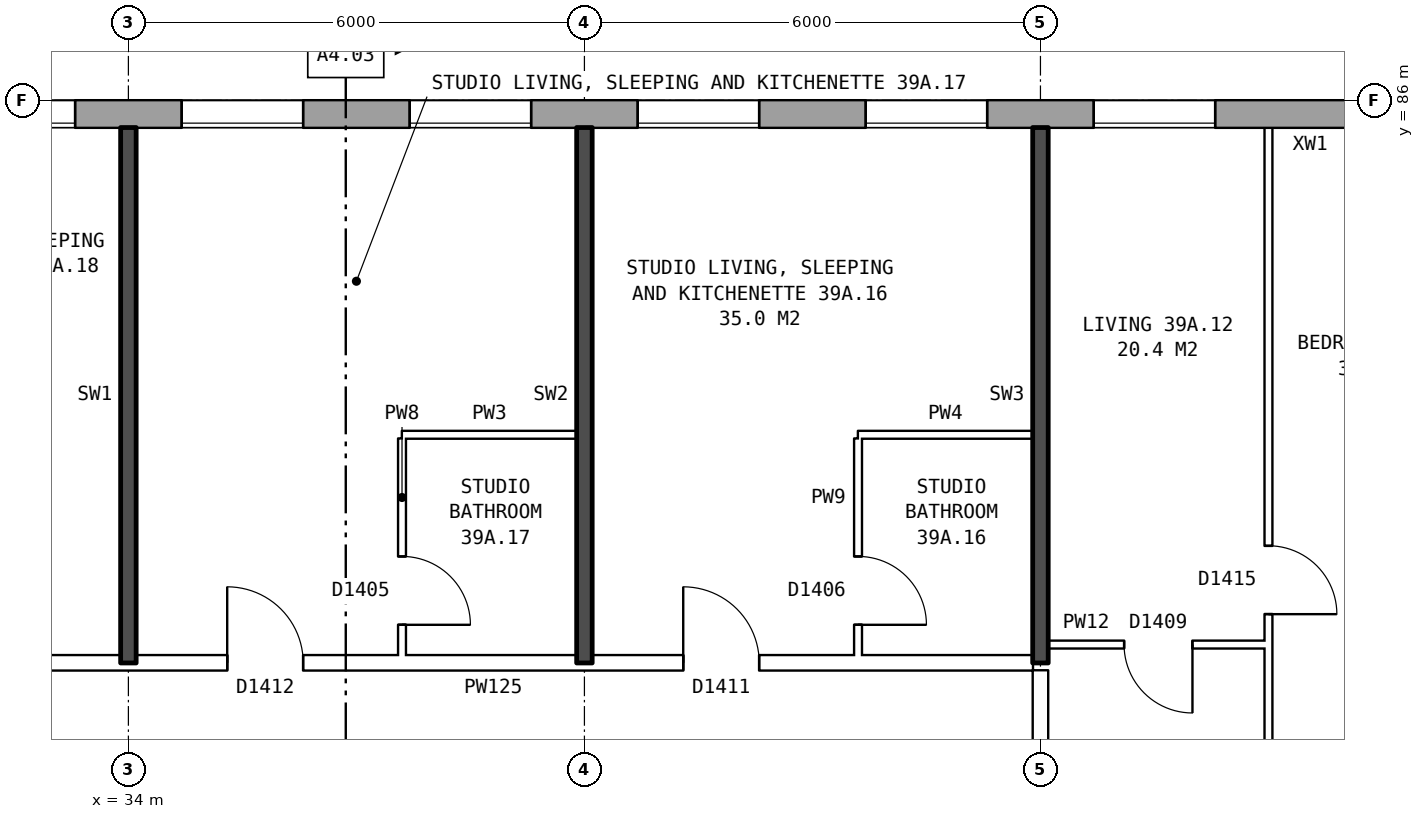
"""IFC4 building model, lengths in metres.
Left out: names, types, materials, properties, quantities, classifications, styles, units other than length and angle.
Written with IfcOpenShell. Run it as: python <this file> out.ifc"""

import sys

from ifc_helpers import new_model, si_unit, direction, frame, frame_2d, origin, place, context, subcontext, project, spatial, rectangle, extrude, element, fill, save


model = new_model("IFC4")
c1 = context("Model", 3, precision=1e-05, world=origin(), true_north=direction((0.0, 1.0)))
c2 = subcontext(c1, "Body", "Model", "MODEL_VIEW")
j1 = project(units=[si_unit("LENGTHUNIT", "METRE"), si_unit("PLANEANGLEUNIT", "RADIAN")], contexts=[c1])
p1 = place(None, origin())
s1 = spatial("IfcSite", under=j1, at=p1, CompositionType="ELEMENT")
p2 = place(p1, origin())
s2 = spatial("IfcBuilding", under=s1, at=p2, CompositionType="ELEMENT")
p3 = place(p2, frame((0.0, 0.0, 139.2)))
s3 = spatial("IfcBuildingStorey", under=s2, at=p3, CompositionType="ELEMENT", Elevation=139.2)
p4 = place(p3, frame((72.925, 85.82, 0.0), z_axis=(0.0, 0.0, 1.0), x_axis=(-1.0, 0.0, 0.0)))
e1 = element("IfcWall", 1, at=p4, inside=s3, PredefinedType="STANDARD", context=c2, shape_type="SweptSolid", body=[
    extrude(rectangle(XDim=43.101, YDim=0.36, at=frame_2d((21.55, 0.0))), origin(), (0.0, 0.0, 1.0), 2.85),
])
p5 = place(p4, frame((0.625, 0.0, 0.8)))
e2 = element("IfcOpeningElement", 2, at=p5, cuts=e1, PredefinedType="OPENING", context=c2, shape_type="SweptSolid", body=[
    extrude(rectangle(XDim=1.6, YDim=1.8, at=frame_2d((0.8, 0.9))), frame((0.0, 0.19, 0.0), z_axis=(0.0, -1.0, 0.0), x_axis=(1.0, 0.0, 0.0)), (0.0, 0.0, 1.0), 0.38),
])
p6 = place(p4, frame((3.625, 0.0, 0.8)))
e3 = element("IfcOpeningElement", 3, at=p6, cuts=e1, PredefinedType="OPENING", context=c2, shape_type="SweptSolid", body=[
    extrude(rectangle(XDim=1.6, YDim=1.8, at=frame_2d((0.8, 0.9))), frame((0.0, 0.19, 0.0), z_axis=(0.0, -1.0, 0.0), x_axis=(1.0, 0.0, 0.0)), (0.0, 0.0, 1.0), 0.38),
])
p7 = place(p4, frame((6.625, 0.0, 0.8)))
e4 = element("IfcOpeningElement", 4, at=p7, cuts=e1, PredefinedType="OPENING", context=c2, shape_type="SweptSolid", body=[
    extrude(rectangle(XDim=1.6, YDim=1.8, at=frame_2d((0.8, 0.9))), frame((0.0, 0.19, 0.0), z_axis=(0.0, -1.0, 0.0), x_axis=(1.0, 0.0, 0.0)), (0.0, 0.0, 1.0), 0.38),
])
p8 = place(p4, frame((9.625, 0.0, 0.8)))
e5 = element("IfcOpeningElement", 5, at=p8, cuts=e1, PredefinedType="OPENING", context=c2, shape_type="SweptSolid", body=[
    extrude(rectangle(XDim=1.6, YDim=1.8, at=frame_2d((0.8, 0.9))), frame((0.0, 0.19, 0.0), z_axis=(0.0, -1.0, 0.0), x_axis=(1.0, 0.0, 0.0)), (0.0, 0.0, 1.0), 0.38),
])
p9 = place(p4, frame((12.625, 0.0, 0.8)))
e6 = element("IfcOpeningElement", 6, at=p9, cuts=e1, PredefinedType="OPENING", context=c2, shape_type="SweptSolid", body=[
    extrude(rectangle(XDim=1.6, YDim=1.8, at=frame_2d((0.8, 0.9))), frame((0.0, 0.19, 0.0), z_axis=(0.0, -1.0, 0.0), x_axis=(1.0, 0.0, 0.0)), (0.0, 0.0, 1.0), 0.38),
])
p10 = place(p4, frame((15.625, 0.0, 0.8)))
e7 = element("IfcOpeningElement", 7, at=p10, cuts=e1, PredefinedType="OPENING", context=c2, shape_type="SweptSolid", body=[
    extrude(rectangle(XDim=1.6, YDim=1.8, at=frame_2d((0.8, 0.9))), frame((0.0, 0.19, 0.0), z_axis=(0.0, -1.0, 0.0), x_axis=(1.0, 0.0, 0.0)), (0.0, 0.0, 1.0), 0.38),
])
p11 = place(p4, frame((18.075, 0.0, 0.8)))
e8 = element("IfcOpeningElement", 8, at=p11, cuts=e1, PredefinedType="OPENING", context=c2, shape_type="SweptSolid", body=[
    extrude(rectangle(XDim=0.8, YDim=1.8, at=frame_2d((0.4, 0.9))), frame((0.0, 0.19, 0.0), z_axis=(0.0, -1.0, 0.0), x_axis=(1.0, 0.0, 0.0)), (0.0, 0.0, 1.0), 0.38),
])
p12 = place(p4, frame((21.125, 0.0, 0.15)))
e9 = element("IfcOpeningElement", 9, at=p12, cuts=e1, PredefinedType="OPENING", context=c2, shape_type="SweptSolid", body=[
    extrude(rectangle(XDim=1.0, YDim=1.5, at=frame_2d((0.5, 0.75))), frame((0.0, 0.19, 0.0), z_axis=(0.0, -1.0, 0.0), x_axis=(1.0, 0.0, 0.0)), (0.0, 0.0, 1.0), 0.38),
])
p13 = place(p4, frame((24.625, 0.0, 0.8)))
e10 = element("IfcOpeningElement", 10, at=p13, cuts=e1, PredefinedType="OPENING", context=c2, shape_type="SweptSolid", body=[
    extrude(rectangle(XDim=1.6, YDim=1.8, at=frame_2d((0.8, 0.9))), frame((0.0, 0.19, 0.0), z_axis=(0.0, -1.0, 0.0), x_axis=(1.0, 0.0, 0.0)), (0.0, 0.0, 1.0), 0.38),
])
p14 = place(p4, frame((27.625, 0.0, 0.8)))
e11 = element("IfcOpeningElement", 11, at=p14, cuts=e1, PredefinedType="OPENING", context=c2, shape_type="SweptSolid", body=[
    extrude(rectangle(XDim=1.6, YDim=1.8, at=frame_2d((0.8, 0.9))), frame((0.0, 0.19, 0.0), z_axis=(0.0, -1.0, 0.0), x_axis=(1.0, 0.0, 0.0)), (0.0, 0.0, 1.0), 0.38),
])
p15 = place(p4, frame((30.625, 0.0, 0.8)))
e12 = element("IfcOpeningElement", 12, at=p15, cuts=e1, PredefinedType="OPENING", context=c2, shape_type="SweptSolid", body=[
    extrude(rectangle(XDim=1.6, YDim=1.8, at=frame_2d((0.8, 0.9))), frame((0.0, 0.19, 0.0), z_axis=(0.0, -1.0, 0.0), x_axis=(1.0, 0.0, 0.0)), (0.0, 0.0, 1.0), 0.38),
])
p16 = place(p4, frame((33.625, 0.0, 0.8)))
e13 = element("IfcOpeningElement", 13, at=p16, cuts=e1, PredefinedType="OPENING", context=c2, shape_type="SweptSolid", body=[
    extrude(rectangle(XDim=1.6, YDim=1.8, at=frame_2d((0.8, 0.9))), frame((0.0, 0.19, 0.0), z_axis=(0.0, -1.0, 0.0), x_axis=(1.0, 0.0, 0.0)), (0.0, 0.0, 1.0), 0.38),
])
p17 = place(p4, frame((36.625, 0.0, 0.8)))
e14 = element("IfcOpeningElement", 14, at=p17, cuts=e1, PredefinedType="OPENING", context=c2, shape_type="SweptSolid", body=[
    extrude(rectangle(XDim=1.6, YDim=1.8, at=frame_2d((0.8, 0.9))), frame((0.0, 0.19, 0.0), z_axis=(0.0, -1.0, 0.0), x_axis=(1.0, 0.0, 0.0)), (0.0, 0.0, 1.0), 0.38),
])
p18 = place(p4, frame((39.625, 0.0, 0.8)))
e15 = element("IfcOpeningElement", 15, at=p18, cuts=e1, PredefinedType="OPENING", context=c2, shape_type="SweptSolid", body=[
    extrude(rectangle(XDim=1.6, YDim=1.8, at=frame_2d((0.8, 0.9))), frame((0.0, 0.19, 0.0), z_axis=(0.0, -1.0, 0.0), x_axis=(1.0, 0.0, 0.0)), (0.0, 0.0, 1.0), 0.38),
])
p19 = place(p4, frame((19.175, 0.0, 1.6)))
e16 = element("IfcOpeningElement", 16, at=p19, cuts=e1, PredefinedType="OPENING", context=c2, shape_type="SweptSolid", body=[
    extrude(rectangle(XDim=0.6, YDim=0.9, at=frame_2d((0.3, 0.45))), frame((0.0, 0.19, 0.0), z_axis=(0.0, -1.0, 0.0), x_axis=(1.0, 0.0, 0.0)), (0.0, 0.0, 1.0), 0.38),
])
p20 = place(p3, frame((27.11, 78.6, 0.0), z_axis=(0.0, 0.0, 1.0), x_axis=(1.0, 0.0, 0.0)))
e17 = element("IfcWall", 17, at=p20, inside=s3, PredefinedType="PARTITIONING", context=c2, shape_type="SweptSolid", body=[
    extrude(rectangle(XDim=18.79, YDim=0.2, at=frame_2d((9.395, 0.0))), origin(), (0.0, 0.0, 1.0), 2.85),
])
p21 = place(p20, frame((14.19, 0.0, 0.0)))
e18 = element("IfcOpeningElement", 18, at=p21, cuts=e17, PredefinedType="OPENING", context=c2, shape_type="SweptSolid", body=[
    extrude(rectangle(XDim=1.0, YDim=2.1, at=frame_2d((0.5, 1.05))), frame((0.0, 0.11, 0.0), z_axis=(0.0, -1.0, 0.0), x_axis=(1.0, 0.0, 0.0)), (0.0, 0.0, 1.0), 0.22),
])
p22 = place(p20, frame((8.19, 0.0, 0.0)))
e19 = element("IfcOpeningElement", 19, at=p22, cuts=e17, PredefinedType="OPENING", context=c2, shape_type="SweptSolid", body=[
    extrude(rectangle(XDim=1.0, YDim=2.1, at=frame_2d((0.5, 1.05))), frame((0.0, 0.11, 0.0), z_axis=(0.0, -1.0, 0.0), x_axis=(1.0, 0.0, 0.0)), (0.0, 0.0, 1.0), 0.22),
])
p23 = place(p20, frame((4.59, 0.0, 0.0)))
e20 = element("IfcOpeningElement", 20, at=p23, cuts=e17, PredefinedType="OPENING", context=c2, shape_type="SweptSolid", body=[
    extrude(rectangle(XDim=1.0, YDim=2.1, at=frame_2d((0.5, 1.05))), frame((0.0, 0.11, 0.0), z_axis=(0.0, -1.0, 0.0), x_axis=(1.0, 0.0, 0.0)), (0.0, 0.0, 1.0), 0.22),
])
p24 = place(p3, frame((46.1, 78.84, 0.0), z_axis=(0.0, 0.0, 1.0), x_axis=(1.0, 0.0, 0.0)))
e21 = element("IfcWall", 21, at=p24, inside=s3, PredefinedType="PARTITIONING", context=c2, shape_type="SweptSolid", body=[
    extrude(rectangle(XDim=2.9, YDim=0.1, at=frame_2d((1.45, 0.0))), origin(), (0.0, 0.0, 1.0), 2.85),
])
p25 = place(p24, frame((1.0, 0.0, 0.0)))
e22 = element("IfcOpeningElement", 22, at=p25, cuts=e21, PredefinedType="OPENING", context=c2, shape_type="SweptSolid", body=[
    extrude(rectangle(XDim=0.9, YDim=2.1, at=frame_2d((0.45, 1.05))), frame((0.0, 0.06, 0.0), z_axis=(0.0, -1.0, 0.0), x_axis=(1.0, 0.0, 0.0)), (0.0, 0.0, 1.0), 0.12),
])
for number, where, z_axis, x_axis in (
    (23, (37.6, 81.6, 0.0), (0.0, 0.0, 1.0), (1.0, 0.0, 0.0)),
    (24, (43.6, 81.6, 0.0), (0.0, 0.0, 1.0), (1.0, 0.0, 0.0)),
):
    element("IfcWall", number, at=place(p3, frame(where, z_axis=z_axis, x_axis=x_axis)), inside=s3, PredefinedType="PARTITIONING", context=c2, shape_type="SweptSolid", body=[
        extrude(rectangle(XDim=2.3, YDim=0.1, at=frame_2d((1.15, 0.0))), origin(), (0.0, 0.0, 1.0), 2.85),
    ])
p26 = place(p3, frame((34.0, 78.6, 0.0), z_axis=(0.0, 0.0, 1.0), x_axis=(0.0, 1.0, 0.0)))
e25 = element("IfcWall", 25, at=p26, inside=s3, PredefinedType="SOLIDWALL", context=c2, shape_type="SweptSolid", body=[
    extrude(rectangle(XDim=7.04, YDim=0.2, at=frame_2d((3.52, 0.0))), origin(), (0.0, 0.0, 1.0), 2.85),
])
p27 = place(p3, frame((37.6, 78.7, 0.0), z_axis=(0.0, 0.0, 1.0), x_axis=(0.0, 1.0, 0.0)))
e26 = element("IfcWall", 26, at=p27, inside=s3, PredefinedType="PARTITIONING", context=c2, shape_type="SweptSolid", body=[
    extrude(rectangle(XDim=2.85, YDim=0.1, at=frame_2d((1.425, 0.0))), origin(), (0.0, 0.0, 1.0), 2.85),
])
p28 = place(p27, frame((0.4, 0.0, 0.0)))
e27 = element("IfcOpeningElement", 27, at=p28, cuts=e26, PredefinedType="OPENING", context=c2, shape_type="SweptSolid", body=[
    extrude(rectangle(XDim=0.9, YDim=2.1, at=frame_2d((0.45, 1.05))), frame((0.0, 0.06, 0.0), z_axis=(0.0, -1.0, 0.0), x_axis=(1.0, 0.0, 0.0)), (0.0, 0.0, 1.0), 0.12),
])
p29 = place(p3, frame((40.0, 78.6, 0.0), z_axis=(0.0, 0.0, 1.0), x_axis=(0.0, 1.0, 0.0)))
e28 = element("IfcWall", 28, at=p29, inside=s3, PredefinedType="SOLIDWALL", context=c2, shape_type="SweptSolid", body=[
    extrude(rectangle(XDim=7.04, YDim=0.2, at=frame_2d((3.52, 0.0))), origin(), (0.0, 0.0, 1.0), 2.85),
])
p30 = place(p3, frame((43.6, 78.7, 0.0), z_axis=(0.0, 0.0, 1.0), x_axis=(0.0, 1.0, 0.0)))
e29 = element("IfcWall", 29, at=p30, inside=s3, PredefinedType="PARTITIONING", context=c2, shape_type="SweptSolid", body=[
    extrude(rectangle(XDim=2.85, YDim=0.1, at=frame_2d((1.425, 0.0))), origin(), (0.0, 0.0, 1.0), 2.85),
])
p31 = place(p30, frame((0.4, 0.0, 0.0)))
e30 = element("IfcOpeningElement", 30, at=p31, cuts=e29, PredefinedType="OPENING", context=c2, shape_type="SweptSolid", body=[
    extrude(rectangle(XDim=0.9, YDim=2.1, at=frame_2d((0.45, 1.05))), frame((0.0, 0.06, 0.0), z_axis=(0.0, -1.0, 0.0), x_axis=(1.0, 0.0, 0.0)), (0.0, 0.0, 1.0), 0.12),
])
p32 = place(p3, frame((46.0, 76.3, 0.0), z_axis=(0.0, 0.0, 1.0), x_axis=(0.0, 1.0, 0.0)))
e31 = element("IfcWall", 31, at=p32, inside=s3, PredefinedType="PARTITIONING", context=c2, shape_type="SweptSolid", body=[
    extrude(rectangle(XDim=2.2, YDim=0.2, at=frame_2d((1.1, 0.0))), origin(), (0.0, 0.0, 1.0), 2.85),
])
p33 = place(p3, frame((46.0, 78.6, 0.0), z_axis=(0.0, 0.0, 1.0), x_axis=(0.0, 1.0, 0.0)))
e32 = element("IfcWall", 32, at=p33, inside=s3, PredefinedType="SOLIDWALL", context=c2, shape_type="SweptSolid", body=[
    extrude(rectangle(XDim=7.04, YDim=0.2, at=frame_2d((3.52, 0.0))), origin(), (0.0, 0.0, 1.0), 2.85),
])
p34 = place(p3, frame((49.0, 71.3, 0.0), z_axis=(0.0, 0.0, 1.0), x_axis=(0.0, 1.0, 0.0)))
e33 = element("IfcWall", 33, at=p34, inside=s3, PredefinedType="PARTITIONING", context=c2, shape_type="SweptSolid", body=[
    extrude(rectangle(XDim=14.34, YDim=0.1, at=frame_2d((7.17, 0.0))), origin(), (0.0, 0.0, 1.0), 2.85),
])
p35 = place(p34, frame((7.94, 0.0, 0.0)))
e34 = element("IfcOpeningElement", 34, at=p35, cuts=e33, PredefinedType="OPENING", context=c2, shape_type="SweptSolid", body=[
    extrude(rectangle(XDim=0.9, YDim=2.1, at=frame_2d((0.45, 1.05))), frame((0.0, 0.06, 0.0), z_axis=(0.0, -1.0, 0.0), x_axis=(1.0, 0.0, 0.0)), (0.0, 0.0, 1.0), 0.12),
])
p36 = place(p34, frame((0.4, 0.0, 0.0)))
e35 = element("IfcOpeningElement", 35, at=p36, cuts=e33, PredefinedType="OPENING", context=c2, shape_type="SweptSolid", body=[
    extrude(rectangle(XDim=0.9, YDim=2.1, at=frame_2d((0.45, 1.05))), frame((0.0, 0.06, 0.0), z_axis=(0.0, -1.0, 0.0), x_axis=(1.0, 0.0, 0.0)), (0.0, 0.0, 1.0), 0.12),
])
p37 = place(p13, origin())
e36 = element("IfcWindow", 36, at=p37, inside=s3, PartitioningType="SINGLE_PANEL", PredefinedType="WINDOW", context=c2, shape_type="SweptSolid", body=[
    extrude(rectangle(XDim=1.6, YDim=1.8, at=frame_2d((0.8, 0.9))), frame((0.0, 0.15, 0.0), z_axis=(0.0, -1.0, 0.0), x_axis=(1.0, 0.0, 0.0)), (0.0, 0.0, 1.0), 0.06),
])
fill(e10, e36)
p38 = place(p14, origin())
e37 = element("IfcWindow", 37, at=p38, inside=s3, PartitioningType="SINGLE_PANEL", PredefinedType="WINDOW", context=c2, shape_type="SweptSolid", body=[
    extrude(rectangle(XDim=1.6, YDim=1.8, at=frame_2d((0.8, 0.9))), frame((0.0, 0.15, 0.0), z_axis=(0.0, -1.0, 0.0), x_axis=(1.0, 0.0, 0.0)), (0.0, 0.0, 1.0), 0.06),
])
fill(e11, e37)
p39 = place(p15, origin())
e38 = element("IfcWindow", 38, at=p39, inside=s3, PartitioningType="SINGLE_PANEL", PredefinedType="WINDOW", context=c2, shape_type="SweptSolid", body=[
    extrude(rectangle(XDim=1.6, YDim=1.8, at=frame_2d((0.8, 0.9))), frame((0.0, 0.15, 0.0), z_axis=(0.0, -1.0, 0.0), x_axis=(1.0, 0.0, 0.0)), (0.0, 0.0, 1.0), 0.06),
])
fill(e12, e38)
p40 = place(p16, origin())
e39 = element("IfcWindow", 39, at=p40, inside=s3, PartitioningType="SINGLE_PANEL", PredefinedType="WINDOW", context=c2, shape_type="SweptSolid", body=[
    extrude(rectangle(XDim=1.6, YDim=1.8, at=frame_2d((0.8, 0.9))), frame((0.0, 0.15, 0.0), z_axis=(0.0, -1.0, 0.0), x_axis=(1.0, 0.0, 0.0)), (0.0, 0.0, 1.0), 0.06),
])
fill(e13, e39)
p41 = place(p17, origin())
e40 = element("IfcWindow", 40, at=p41, inside=s3, PartitioningType="SINGLE_PANEL", PredefinedType="WINDOW", context=c2, shape_type="SweptSolid", body=[
    extrude(rectangle(XDim=1.6, YDim=1.8, at=frame_2d((0.8, 0.9))), frame((0.0, 0.15, 0.0), z_axis=(0.0, -1.0, 0.0), x_axis=(1.0, 0.0, 0.0)), (0.0, 0.0, 1.0), 0.06),
])
fill(e14, e40)
p42 = place(p18, origin())
e41 = element("IfcWindow", 41, at=p42, inside=s3, PartitioningType="SINGLE_PANEL", PredefinedType="WINDOW", context=c2, shape_type="SweptSolid", body=[
    extrude(rectangle(XDim=1.6, YDim=1.8, at=frame_2d((0.8, 0.9))), frame((0.0, 0.15, 0.0), z_axis=(0.0, -1.0, 0.0), x_axis=(1.0, 0.0, 0.0)), (0.0, 0.0, 1.0), 0.06),
])
fill(e15, e41)
p43 = place(p35, frame((0.9, 0.0, 0.0), z_axis=(0.0, 0.0, 1.0), x_axis=(-1.0, 0.0, 0.0)))
e42 = element("IfcDoor", 42, at=p43, inside=s3, OperationType="SINGLE_SWING_RIGHT", PredefinedType="DOOR", context=c2, shape_type="SweptSolid", body=[
    extrude(rectangle(XDim=0.9, YDim=2.1, at=frame_2d((0.45, 1.05))), frame((0.0, 0.025, 0.0), z_axis=(0.0, -1.0, 0.0), x_axis=(1.0, 0.0, 0.0)), (0.0, 0.0, 1.0), 0.05),
])
fill(e34, e42)
p44 = place(p25, frame((0.9, 0.0, 0.0), z_axis=(0.0, 0.0, 1.0), x_axis=(-1.0, 0.0, 0.0)))
e43 = element("IfcDoor", 43, at=p44, inside=s3, OperationType="SINGLE_SWING_LEFT", PredefinedType="DOOR", context=c2, shape_type="SweptSolid", body=[
    extrude(rectangle(XDim=0.9, YDim=2.1, at=frame_2d((0.45, 1.05))), frame((0.0, 0.025, 0.0), z_axis=(0.0, -1.0, 0.0), x_axis=(1.0, 0.0, 0.0)), (0.0, 0.0, 1.0), 0.05),
])
fill(e22, e43)
p45 = place(p21, origin())
e44 = element("IfcDoor", 44, at=p45, inside=s3, OperationType="SINGLE_SWING_LEFT", PredefinedType="DOOR", context=c2, shape_type="SweptSolid", body=[
    extrude(rectangle(XDim=1.0, YDim=2.1, at=frame_2d((0.5, 1.05))), frame((0.0, 0.025, 0.0), z_axis=(0.0, -1.0, 0.0), x_axis=(1.0, 0.0, 0.0)), (0.0, 0.0, 1.0), 0.05),
])
fill(e18, e44)
p46 = place(p31, frame((0.9, 0.0, 0.0), z_axis=(0.0, 0.0, 1.0), x_axis=(-1.0, 0.0, 0.0)))
e45 = element("IfcDoor", 45, at=p46, inside=s3, OperationType="SINGLE_SWING_RIGHT", PredefinedType="DOOR", context=c2, shape_type="SweptSolid", body=[
    extrude(rectangle(XDim=0.9, YDim=2.1, at=frame_2d((0.45, 1.05))), frame((0.0, 0.025, 0.0), z_axis=(0.0, -1.0, 0.0), x_axis=(1.0, 0.0, 0.0)), (0.0, 0.0, 1.0), 0.05),
])
fill(e30, e45)
p47 = place(p22, origin())
e46 = element("IfcDoor", 46, at=p47, inside=s3, OperationType="SINGLE_SWING_LEFT", PredefinedType="DOOR", context=c2, shape_type="SweptSolid", body=[
    extrude(rectangle(XDim=1.0, YDim=2.1, at=frame_2d((0.5, 1.05))), frame((0.0, 0.025, 0.0), z_axis=(0.0, -1.0, 0.0), x_axis=(1.0, 0.0, 0.0)), (0.0, 0.0, 1.0), 0.05),
])
fill(e19, e46)
p48 = place(p28, frame((0.9, 0.0, 0.0), z_axis=(0.0, 0.0, 1.0), x_axis=(-1.0, 0.0, 0.0)))
e47 = element("IfcDoor", 47, at=p48, inside=s3, OperationType="SINGLE_SWING_RIGHT", PredefinedType="DOOR", context=c2, shape_type="SweptSolid", body=[
    extrude(rectangle(XDim=0.9, YDim=2.1, at=frame_2d((0.45, 1.05))), frame((0.0, 0.025, 0.0), z_axis=(0.0, -1.0, 0.0), x_axis=(1.0, 0.0, 0.0)), (0.0, 0.0, 1.0), 0.05),
])
fill(e27, e47)
save(model, sys.argv[1])
